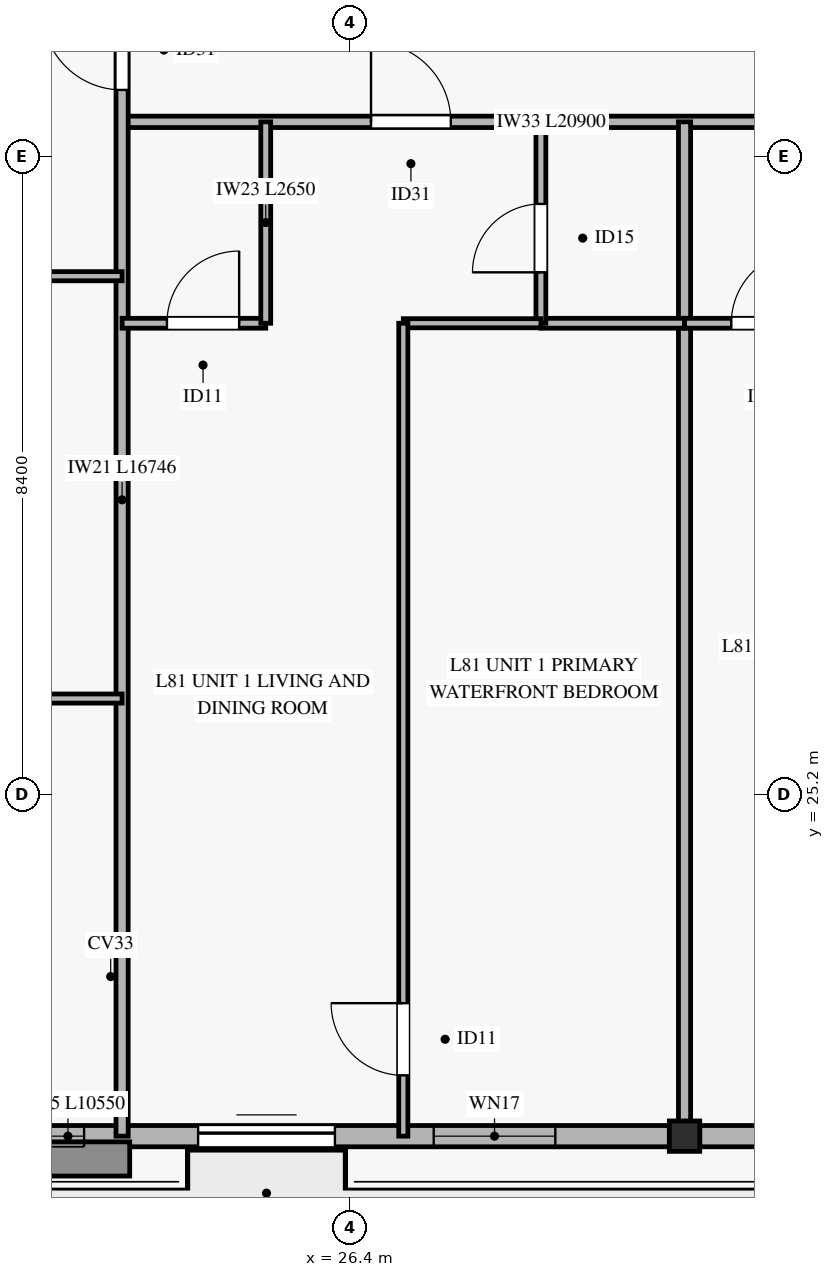
"""IFC4 building model, lengths in metres.
Left out: names, types, materials, properties, quantities, classifications, styles, units other than length and angle.
Written with IfcOpenShell. Run it as: python <this file> out.ifc"""

import sys

from ifc_helpers import new_model, si_unit, direction, frame, frame_2d, origin, origin_2d, place, context, subcontext, project, spatial, rectangle, hollow_rectangle, extrude, source, transform, mapped, element, fill, save


model = new_model("IFC4")
c1 = context("Model", 3, precision=1e-05, world=origin(), true_north=direction((0.0, 1.0)))
c2 = subcontext(c1, "Body", "Model", "MODEL_VIEW")
j1 = project(units=[si_unit("LENGTHUNIT", "METRE"), si_unit("PLANEANGLEUNIT", "RADIAN")], contexts=[c1])
p1 = place(None, origin())
s1 = spatial("IfcSite", under=j1, at=p1, CompositionType="ELEMENT")
p2 = place(p1, origin())
s2 = spatial("IfcBuilding", under=s1, at=p2, CompositionType="ELEMENT")
p3 = place(p2, frame((0.0, 0.0, 314.2)))
s3 = spatial("IfcBuildingStorey", under=s2, at=p3, CompositionType="ELEMENT", Elevation=314.2)
m1 = source(origin(), c2, "Body", "SweptSolid", [
    extrude(hollow_rectangle(XDim=0.4, YDim=0.4, WallThickness=0.02, at=origin_2d()), origin(), (0.0, 0.0, 1.0), 3.185),
])
p4 = place(p3, frame((30.8, 20.704, 0.0), z_axis=(0.0, 0.0, 1.0), x_axis=(1.0, 0.0, 0.0)))
e1 = element("IfcColumn", 1, at=p4, inside=s3, PredefinedType="COLUMN", context=c2, shape_type="MappedRepresentation", body=[
    mapped(m1, transform((0.0, 0.0, 0.0), x_axis=(1.0, 0.0, 0.0), y_axis=(0.0, 1.0, 0.0), z_axis=(0.0, 0.0, 1.0), scale=1.0)),
])
p5 = place(p3, frame((20.05, 20.704, 0.0), z_axis=(0.0, 0.0, 1.0), x_axis=(1.0, 0.0, 0.0)))
e2 = element("IfcWall", 2, at=p5, inside=s3, PredefinedType="SOLIDWALL", context=c2, shape_type="SweptSolid", body=[
    extrude(rectangle(XDim=10.55, YDim=0.28, at=frame_2d((5.275, 0.0))), origin(), (0.0, 0.0, 1.0), 2.815),
])
p6 = place(p5, frame((4.35, 0.0, 0.0)))
e3 = element("IfcOpeningElement", 3, at=p6, cuts=e2, PredefinedType="OPENING", context=c2, shape_type="SweptSolid", body=[
    extrude(rectangle(XDim=1.8, YDim=2.25, at=frame_2d((0.9, 1.125))), frame((0.0, 0.15, 0.0), z_axis=(0.0, -1.0, 0.0), x_axis=(1.0, 0.0, 0.0)), (0.0, 0.0, 1.0), 0.3),
])
p7 = place(p5, frame((0.65, 0.0, 0.45)))
e4 = element("IfcOpeningElement", 4, at=p7, cuts=e2, PredefinedType="OPENING", context=c2, shape_type="SweptSolid", body=[
    extrude(rectangle(XDim=2.2, YDim=2.1, at=frame_2d((1.1, 1.05))), frame((0.0, 0.15, 0.0), z_axis=(0.0, -1.0, 0.0), x_axis=(1.0, 0.0, 0.0)), (0.0, 0.0, 1.0), 0.3),
])
p8 = place(p5, frame((7.45, 0.0, 0.45)))
e5 = element("IfcOpeningElement", 5, at=p8, cuts=e2, PredefinedType="OPENING", context=c2, shape_type="SweptSolid", body=[
    extrude(rectangle(XDim=1.6, YDim=2.0, at=frame_2d((0.8, 1.0))), frame((0.0, 0.15, 0.0), z_axis=(0.0, -1.0, 0.0), x_axis=(1.0, 0.0, 0.0)), (0.0, 0.0, 1.0), 0.3),
])
p9 = place(p3, frame((31.0, 20.704, 0.0), z_axis=(0.0, 0.0, 1.0), x_axis=(1.0, 0.0, 0.0)))
e6 = element("IfcWall", 6, at=p9, inside=s3, PredefinedType="SOLIDWALL", context=c2, shape_type="SweptSolid", body=[
    extrude(rectangle(XDim=6.35, YDim=0.28, at=frame_2d((3.175, 0.0))), origin(), (0.0, 0.0, 1.0), 2.815),
])
p10 = place(p3, frame((23.4, 34.05, 0.0), z_axis=(0.0, 0.0, 1.0), x_axis=(1.0, 0.0, 0.0)))
e7 = element("IfcWall", 7, at=p10, inside=s3, PredefinedType="PARTITIONING", context=c2, shape_type="SweptSolid", body=[
    extrude(rectangle(XDim=20.9, YDim=0.15, at=frame_2d((10.45, 0.0))), origin(), (0.0, 0.0, 1.0), 2.47),
])
p11 = place(p10, frame((3.275, 0.0, 0.0)))
e8 = element("IfcOpeningElement", 8, at=p11, cuts=e7, PredefinedType="OPENING", context=c2, shape_type="SweptSolid", body=[
    extrude(rectangle(XDim=1.05, YDim=2.15, at=frame_2d((0.525, 1.075))), frame((0.0, 0.085, 0.0), z_axis=(0.0, -1.0, 0.0), x_axis=(1.0, 0.0, 0.0)), (0.0, 0.0, 1.0), 0.17),
])
p12 = place(p10, frame((10.775, 0.0, 0.0)))
e9 = element("IfcOpeningElement", 9, at=p12, cuts=e7, PredefinedType="OPENING", context=c2, shape_type="SweptSolid", body=[
    extrude(rectangle(XDim=1.05, YDim=2.15, at=frame_2d((0.525, 1.075))), frame((0.0, 0.085, 0.0), z_axis=(0.0, -1.0, 0.0), x_axis=(1.0, 0.0, 0.0)), (0.0, 0.0, 1.0), 0.17),
])
p13 = place(p10, frame((17.525, 0.0, 0.0)))
e10 = element("IfcOpeningElement", 10, at=p13, cuts=e7, PredefinedType="OPENING", context=c2, shape_type="SweptSolid", body=[
    extrude(rectangle(XDim=1.05, YDim=2.15, at=frame_2d((0.525, 1.075))), frame((0.0, 0.085, 0.0), z_axis=(0.0, -1.0, 0.0), x_axis=(1.0, 0.0, 0.0)), (0.0, 0.0, 1.0), 0.17),
])
p14 = place(p3, frame((23.4, 20.704, 0.0), z_axis=(0.0, 0.0, 1.0), x_axis=(0.0, 1.0, 0.0)))
e11 = element("IfcWall", 11, at=p14, inside=s3, PredefinedType="PARTITIONING", context=c2, shape_type="SweptSolid", body=[
    extrude(rectangle(XDim=16.746, YDim=0.16, at=frame_2d((8.373, 0.0))), origin(), (0.0, 0.0, 1.0), 2.77),
])
p15 = place(p14, frame((13.766, 0.0, 0.0)))
e12 = element("IfcOpeningElement", 12, at=p15, cuts=e11, PredefinedType="OPENING", context=c2, shape_type="SweptSolid", body=[
    extrude(rectangle(XDim=1.05, YDim=2.15, at=frame_2d((0.525, 1.075))), frame((0.0, 0.09, 0.0), z_axis=(0.0, -1.0, 0.0), x_axis=(1.0, 0.0, 0.0)), (0.0, 0.0, 1.0), 0.18),
])
p16 = place(p3, frame((30.8, 20.704, 0.0), z_axis=(0.0, 0.0, 1.0), x_axis=(0.0, 1.0, 0.0)))
e13 = element("IfcWall", 13, at=p16, inside=s3, PredefinedType="PARTITIONING", context=c2, shape_type="SweptSolid", body=[
    extrude(rectangle(XDim=13.346, YDim=0.16, at=frame_2d((6.673, 0.0))), origin(), (0.0, 0.0, 1.0), 2.47),
])
p17 = place(p3, frame((10.855, 26.462, 0.0), z_axis=(0.0, 0.0, 1.0), x_axis=(1.0, 0.0, 0.0)))
e14 = element("IfcWall", 14, at=p17, inside=s3, PredefinedType="PARTITIONING", context=c2, shape_type="SweptSolid", body=[
    extrude(rectangle(XDim=12.545, YDim=0.12, at=frame_2d((6.272, 0.0))), origin(), (0.0, 0.0, 1.0), 2.47),
])
p18 = place(p17, frame((5.304, 0.0, 0.0)))
e15 = element("IfcOpeningElement", 15, at=p18, cuts=e14, PredefinedType="OPENING", context=c2, shape_type="SweptSolid", body=[
    extrude(rectangle(XDim=0.95, YDim=2.1, at=frame_2d((0.475, 1.05))), frame((0.0, 0.07, 0.0), z_axis=(0.0, -1.0, 0.0), x_axis=(1.0, 0.0, 0.0)), (0.0, 0.0, 1.0), 0.14),
])
p19 = place(p3, frame((10.855, 32.019, 0.0), z_axis=(0.0, 0.0, 1.0), x_axis=(1.0, 0.0, 0.0)))
e16 = element("IfcWall", 16, at=p19, inside=s3, PredefinedType="PARTITIONING", context=c2, shape_type="SweptSolid", body=[
    extrude(rectangle(XDim=12.545, YDim=0.12, at=frame_2d((6.272, 0.0))), origin(), (0.0, 0.0, 1.0), 2.47),
])
p20 = place(p19, frame((5.304, 0.0, 0.0)))
e17 = element("IfcOpeningElement", 17, at=p20, cuts=e16, PredefinedType="OPENING", context=c2, shape_type="SweptSolid", body=[
    extrude(rectangle(XDim=0.95, YDim=2.1, at=frame_2d((0.475, 1.05))), frame((0.0, 0.07, 0.0), z_axis=(0.0, -1.0, 0.0), x_axis=(1.0, 0.0, 0.0)), (0.0, 0.0, 1.0), 0.14),
])
p21 = place(p3, frame((23.4, 31.4, 0.0), z_axis=(0.0, 0.0, 1.0), x_axis=(1.0, 0.0, 0.0)))
e18 = element("IfcWall", 18, at=p21, inside=s3, PredefinedType="PARTITIONING", context=c2, shape_type="SweptSolid", body=[
    extrude(rectangle(XDim=1.89, YDim=0.13, at=frame_2d((0.945, 0.0))), origin(), (0.0, 0.0, 1.0), 3.185),
])
p22 = place(p21, frame((0.59, 0.0, 0.0)))
e19 = element("IfcOpeningElement", 19, at=p22, cuts=e18, PredefinedType="OPENING", context=c2, shape_type="SweptSolid", body=[
    extrude(rectangle(XDim=0.95, YDim=2.1, at=frame_2d((0.475, 1.05))), frame((0.0, 0.075, 0.0), z_axis=(0.0, -1.0, 0.0), x_axis=(1.0, 0.0, 0.0)), (0.0, 0.0, 1.0), 0.15),
])
p23 = place(p3, frame((25.29, 31.4, 0.0), z_axis=(0.0, 0.0, 1.0), x_axis=(0.0, 1.0, 0.0)))
e20 = element("IfcWall", 20, at=p23, inside=s3, PredefinedType="PARTITIONING", context=c2, shape_type="SweptSolid", body=[
    extrude(rectangle(XDim=2.65, YDim=0.13, at=frame_2d((1.325, 0.0))), origin(), (0.0, 0.0, 1.0), 2.77),
])
p24 = place(p3, frame((28.91, 31.4, 0.0), z_axis=(0.0, 0.0, 1.0), x_axis=(1.0, 0.0, 0.0)))
e21 = element("IfcWall", 21, at=p24, inside=s3, PredefinedType="PARTITIONING", context=c2, shape_type="SweptSolid", body=[
    extrude(rectangle(XDim=1.89, YDim=0.13, at=frame_2d((0.945, 0.0))), origin(), (0.0, 0.0, 1.0), 2.47),
])
p25 = place(p3, frame((28.91, 31.4, 0.0), z_axis=(0.0, 0.0, 1.0), x_axis=(0.0, 1.0, 0.0)))
e22 = element("IfcWall", 22, at=p25, inside=s3, PredefinedType="PARTITIONING", context=c2, shape_type="SweptSolid", body=[
    extrude(rectangle(XDim=2.65, YDim=0.13, at=frame_2d((1.325, 0.0))), origin(), (0.0, 0.0, 1.0), 2.77),
])
p26 = place(p25, frame((0.67, 0.0, 0.0)))
e23 = element("IfcOpeningElement", 23, at=p26, cuts=e22, PredefinedType="OPENING", context=c2, shape_type="SweptSolid", body=[
    extrude(rectangle(XDim=0.9, YDim=2.1, at=frame_2d((0.45, 1.05))), frame((0.0, 0.075, 0.0), z_axis=(0.0, -1.0, 0.0), x_axis=(1.0, 0.0, 0.0)), (0.0, 0.0, 1.0), 0.15),
])
p27 = place(p3, frame((27.1, 31.4, 0.0), z_axis=(0.0, 0.0, 1.0), x_axis=(1.0, 0.0, 0.0)))
e24 = element("IfcWall", 24, at=p27, inside=s3, PredefinedType="PARTITIONING", context=c2, shape_type="SweptSolid", body=[
    extrude(rectangle(XDim=1.81, YDim=0.12, at=frame_2d((0.905, 0.0))), origin(), (0.0, 0.0, 1.0), 3.185),
])
p28 = place(p3, frame((27.1, 20.704, 0.0), z_axis=(0.0, 0.0, 1.0), x_axis=(0.0, 1.0, 0.0)))
e25 = element("IfcWall", 25, at=p28, inside=s3, PredefinedType="PARTITIONING", context=c2, shape_type="SweptSolid", body=[
    extrude(rectangle(XDim=10.696, YDim=0.12, at=frame_2d((5.348, 0.0))), origin(), (0.0, 0.0, 1.0), 2.77),
])
p29 = place(p28, frame((0.8, 0.0, 0.0)))
e26 = element("IfcOpeningElement", 26, at=p29, cuts=e25, PredefinedType="OPENING", context=c2, shape_type="SweptSolid", body=[
    extrude(rectangle(XDim=0.95, YDim=2.1, at=frame_2d((0.475, 1.05))), frame((0.0, 0.07, 0.0), z_axis=(0.0, -1.0, 0.0), x_axis=(1.0, 0.0, 0.0)), (0.0, 0.0, 1.0), 0.14),
])
p30 = place(p3, frame((30.8, 31.4, 0.0), z_axis=(0.0, 0.0, 1.0), x_axis=(1.0, 0.0, 0.0)))
e27 = element("IfcWall", 27, at=p30, inside=s3, PredefinedType="PARTITIONING", context=c2, shape_type="SweptSolid", body=[
    extrude(rectangle(XDim=1.94, YDim=0.13, at=frame_2d((0.97, 0.0))), origin(), (0.0, 0.0, 1.0), 2.47),
])
p31 = place(p30, frame((0.615, 0.0, 0.0)))
e28 = element("IfcOpeningElement", 28, at=p31, cuts=e27, PredefinedType="OPENING", context=c2, shape_type="SweptSolid", body=[
    extrude(rectangle(XDim=0.95, YDim=2.1, at=frame_2d((0.475, 1.05))), frame((0.0, 0.075, 0.0), z_axis=(0.0, -1.0, 0.0), x_axis=(1.0, 0.0, 0.0)), (0.0, 0.0, 1.0), 0.15),
])
m2 = source(origin(), c2, "Body", "SweptSolid", [
    extrude(rectangle(XDim=1.8, YDim=2.25, at=frame_2d((0.9, 1.125))), frame((0.0, 0.025, 0.0), z_axis=(0.0, -1.0, 0.0), x_axis=(1.0, 0.0, 0.0)), (0.0, 0.0, 1.0), 0.05),
])
p32 = place(p6, origin())
e29 = element("IfcDoor", 29, at=p32, inside=s3, OperationType="SLIDING_TO_LEFT", PredefinedType="DOOR", context=c2, shape_type="MappedRepresentation", body=[
    mapped(m2, transform((0.0, 0.0, 0.0), x_axis=(1.0, 0.0, 0.0), y_axis=(0.0, 1.0, 0.0), z_axis=(0.0, 0.0, 1.0), scale=1.0)),
])
fill(e3, e29)
m3 = source(origin(), c2, "Body", "SweptSolid", [
    extrude(rectangle(XDim=2.2, YDim=2.1, at=frame_2d((1.1, 1.05))), frame((0.0, 0.03, 0.0), z_axis=(0.0, -1.0, 0.0), x_axis=(1.0, 0.0, 0.0)), (0.0, 0.0, 1.0), 0.06),
])
p33 = place(p7, origin())
e30 = element("IfcWindow", 30, at=p33, inside=s3, PartitioningType="SINGLE_PANEL", PredefinedType="WINDOW", context=c2, shape_type="MappedRepresentation", body=[
    mapped(m3, transform((0.0, 0.0, 0.0), x_axis=(1.0, 0.0, 0.0), y_axis=(0.0, 1.0, 0.0), z_axis=(0.0, 0.0, 1.0), scale=1.0)),
])
fill(e4, e30)
m4 = source(origin(), c2, "Body", "SweptSolid", [
    extrude(rectangle(XDim=1.6, YDim=2.0, at=frame_2d((0.8, 1.0))), frame((0.0, 0.03, 0.0), z_axis=(0.0, -1.0, 0.0), x_axis=(1.0, 0.0, 0.0)), (0.0, 0.0, 1.0), 0.06),
])
p34 = place(p8, origin())
e31 = element("IfcWindow", 31, at=p34, inside=s3, PartitioningType="SINGLE_PANEL", PredefinedType="WINDOW", context=c2, shape_type="MappedRepresentation", body=[
    mapped(m4, transform((0.0, 0.0, 0.0), x_axis=(1.0, 0.0, 0.0), y_axis=(0.0, 1.0, 0.0), z_axis=(0.0, 0.0, 1.0), scale=1.0)),
])
fill(e5, e31)
m5 = source(origin(), c2, "Body", "SweptSolid", [
    extrude(rectangle(XDim=1.05, YDim=2.15, at=frame_2d((0.525, 1.075))), frame((0.0, 0.025, 0.0), z_axis=(0.0, -1.0, 0.0), x_axis=(1.0, 0.0, 0.0)), (0.0, 0.0, 1.0), 0.05),
])
p35 = place(p15, origin())
e32 = element("IfcDoor", 32, at=p35, inside=s3, OperationType="SINGLE_SWING_RIGHT", PredefinedType="DOOR", context=c2, shape_type="MappedRepresentation", body=[
    mapped(m5, transform((0.0, 0.0, 0.0), x_axis=(1.0, 0.0, 0.0), y_axis=(0.0, 1.0, 0.0), z_axis=(0.0, 0.0, 1.0), scale=1.0)),
])
fill(e12, e32)
p36 = place(p11, origin())
e33 = element("IfcDoor", 33, at=p36, inside=s3, OperationType="SINGLE_SWING_LEFT", PredefinedType="DOOR", context=c2, shape_type="MappedRepresentation", body=[
    mapped(m5, transform((0.0, 0.0, 0.0), x_axis=(1.0, 0.0, 0.0), y_axis=(0.0, 1.0, 0.0), z_axis=(0.0, 0.0, 1.0), scale=1.0)),
])
fill(e8, e33)
m6 = source(origin(), c2, "Body", "SweptSolid", [
    extrude(rectangle(XDim=0.95, YDim=2.1, at=frame_2d((0.475, 1.05))), frame((0.0, 0.025, 0.0), z_axis=(0.0, -1.0, 0.0), x_axis=(1.0, 0.0, 0.0)), (0.0, 0.0, 1.0), 0.05),
])
p37 = place(p22, origin())
e34 = element("IfcDoor", 34, at=p37, inside=s3, OperationType="SINGLE_SWING_RIGHT", PredefinedType="DOOR", context=c2, shape_type="MappedRepresentation", body=[
    mapped(m6, transform((0.0, 0.0, 0.0), x_axis=(1.0, 0.0, 0.0), y_axis=(0.0, 1.0, 0.0), z_axis=(0.0, 0.0, 1.0), scale=1.0)),
])
fill(e19, e34)
m7 = source(origin(), c2, "Body", "SweptSolid", [
    extrude(rectangle(XDim=0.9, YDim=2.1, at=frame_2d((0.45, 1.05))), frame((0.0, 0.025, 0.0), z_axis=(0.0, -1.0, 0.0), x_axis=(1.0, 0.0, 0.0)), (0.0, 0.0, 1.0), 0.05),
])
p38 = place(p26, origin())
e35 = element("IfcDoor", 35, at=p38, inside=s3, OperationType="SINGLE_SWING_LEFT", PredefinedType="DOOR", context=c2, shape_type="MappedRepresentation", body=[
    mapped(m7, transform((0.0, 0.0, 0.0), x_axis=(1.0, 0.0, 0.0), y_axis=(0.0, 1.0, 0.0), z_axis=(0.0, 0.0, 1.0), scale=1.0)),
])
fill(e23, e35)
p39 = place(p29, origin())
e36 = element("IfcDoor", 36, at=p39, inside=s3, OperationType="SINGLE_SWING_RIGHT", PredefinedType="DOOR", context=c2, shape_type="MappedRepresentation", body=[
    mapped(m6, transform((0.0, 0.0, 0.0), x_axis=(1.0, 0.0, 0.0), y_axis=(0.0, 1.0, 0.0), z_axis=(0.0, 0.0, 1.0), scale=1.0)),
])
fill(e26, e36)
p40 = place(p31, origin())
e37 = element("IfcDoor", 37, at=p40, inside=s3, OperationType="SINGLE_SWING_RIGHT", PredefinedType="DOOR", context=c2, shape_type="MappedRepresentation", body=[
    mapped(m6, transform((0.0, 0.0, 0.0), x_axis=(1.0, 0.0, 0.0), y_axis=(0.0, 1.0, 0.0), z_axis=(0.0, 0.0, 1.0), scale=1.0)),
])
fill(e28, e37)
save(model, sys.argv[1])
